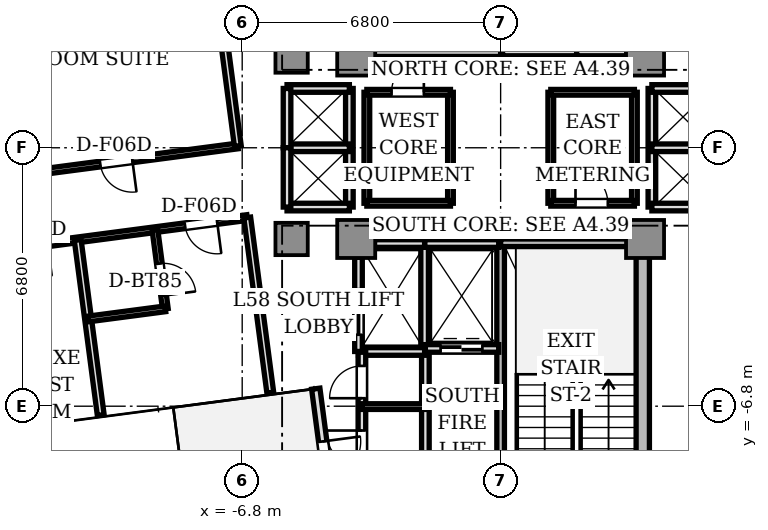
"""IFC4 building model, lengths in metres.
Left out: names, types, materials, properties, quantities, classifications, styles, units other than length and angle.
Written with IfcOpenShell. Run it as: python <this file> out.ifc"""

import sys

from ifc_helpers import new_model, si_unit, direction, frame, frame_2d, origin, origin_2d, place, context, subcontext, project, spatial, rectangle, extrude, source, transform, mapped, element, fill, save


model = new_model("IFC4")
c1 = context("Model", 3, precision=1e-05, world=origin(), true_north=direction((0.0, 1.0)))
c2 = subcontext(c1, "Body", "Model", "MODEL_VIEW")
j1 = project(units=[si_unit("LENGTHUNIT", "METRE"), si_unit("PLANEANGLEUNIT", "RADIAN")], contexts=[c1])
p1 = place(None, origin())
s1 = spatial("IfcSite", under=j1, at=p1, CompositionType="ELEMENT")
p2 = place(p1, origin())
s2 = spatial("IfcBuilding", under=s1, at=p2, CompositionType="ELEMENT")
p3 = place(p2, frame((0.0, 0.0, 209.85)))
s3 = spatial("IfcBuildingStorey", under=s2, at=p3, CompositionType="ELEMENT", Elevation=209.85)
p4 = place(p3, frame((3.74, -9.75, 0.0), z_axis=(0.0, 0.0, 1.0), x_axis=(0.0, 1.0, 0.0)))
e1 = element("IfcWall", 1, at=p4, inside=s3, PredefinedType="SHEAR", context=c2, shape_type="SweptSolid", body=[
    extrude(rectangle(XDim=6.9, YDim=0.35, at=frame_2d((3.45, 0.0))), origin(), (0.0, 0.0, 1.0), 3.11),
])
m1 = source(origin(), c2, "Body", "SweptSolid", [
    extrude(rectangle(XDim=1.0, YDim=1.0, at=origin_2d()), origin(), (0.0, 0.0, 1.0), 3.11),
])
for number, where, z_axis, x_axis in (
    (2, (-3.8, 2.4, 0.0), (0.0, 0.0, 1.0), (1.0, 0.0, 0.0)),
    (3, (3.8, 2.4, 0.0), (0.0, 0.0, 1.0), (1.0, 0.0, 0.0)),
    (4, (-3.8, -2.4, 0.0), (0.0, 0.0, 1.0), (1.0, 0.0, 0.0)),
    (5, (3.8, -2.4, 0.0), (0.0, 0.0, 1.0), (1.0, 0.0, 0.0)),
):
    element("IfcColumn", number, at=place(p3, frame(where, z_axis=z_axis, x_axis=x_axis)), inside=s3, PredefinedType="COLUMN", context=c2, shape_type="MappedRepresentation", body=[
        mapped(m1, transform((0.0, 0.0, 0.0), scale=1.0)),
    ])
m2 = source(origin(), c2, "Body", "SweptSolid", [
    extrude(rectangle(XDim=0.85, YDim=0.85, at=origin_2d()), origin(), (0.0, 0.0, 1.0), 3.11),
])
for number, where, z_axis, x_axis in (
    (6, (-5.5, 2.4, 0.0), (0.0, 0.0, 1.0), (1.0, 0.0, 0.0)),
    (7, (-5.5, -2.4, 0.0), (0.0, 0.0, 1.0), (1.0, 0.0, 0.0)),
):
    element("IfcColumn", number, at=place(p3, frame(where, z_axis=z_axis, x_axis=x_axis)), inside=s3, PredefinedType="COLUMN", context=c2, shape_type="MappedRepresentation", body=[
        mapped(m2, transform((0.0, 0.0, 0.0), scale=1.0)),
    ])
p5 = place(p3, frame((-4.864, -6.339, 0.0), z_axis=(0.0, 0.0, 1.0), x_axis=(0.130564442062, -0.991439824936, 0.0)))
e8 = element("IfcWall", 8, at=p5, inside=s3, PredefinedType="STANDARD", context=c2, shape_type="SweptSolid", body=[
    extrude(rectangle(XDim=2.7, YDim=0.22, at=frame_2d((1.35, 0.0))), origin(), (0.0, 0.0, 1.0), 3.11),
])
p6 = place(p5, frame((1.4, 0.0, 0.0)))
e9 = element("IfcOpeningElement", 9, at=p6, cuts=e8, PredefinedType="OPENING", context=c2, shape_type="SweptSolid", body=[
    extrude(rectangle(XDim=1.0, YDim=2.2, at=frame_2d((0.5, 1.1))), frame((0.0, 0.12, 0.0), z_axis=(0.0, -1.0, 0.0), x_axis=(1.0, 0.0, 0.0)), (0.0, 0.0, 1.0), 0.24),
])
p7 = place(p3, frame((0.0, 2.5, 0.0), z_axis=(0.0, 0.0, 1.0), x_axis=(0.0, 1.0, 0.0)))
e10 = element("IfcWall", 10, at=p7, inside=s3, PredefinedType="SOLIDWALL", context=c2, shape_type="SweptSolid", body=[
    extrude(rectangle(XDim=7.68, YDim=0.2, at=frame_2d((3.84, 0.0))), origin(), (0.0, 0.0, 1.0), 3.11),
])
p8 = place(p7, frame((6.36, 0.0, 0.0)))
e11 = element("IfcOpeningElement", 11, at=p8, cuts=e10, PredefinedType="OPENING", context=c2, shape_type="SweptSolid", body=[
    extrude(rectangle(XDim=1.1, YDim=2.15, at=frame_2d((0.55, 1.075))), frame((0.0, 0.11, 0.0), z_axis=(0.0, -1.0, 0.0), x_axis=(1.0, 0.0, 0.0)), (0.0, 0.0, 1.0), 0.22),
])
p9 = place(p3, frame((-3.72, 2.5, 0.0), z_axis=(0.0, 0.0, 1.0), x_axis=(1.0, 0.0, 0.0)))
e12 = element("IfcWall", 12, at=p9, inside=s3, PredefinedType="SOLIDWALL", context=c2, shape_type="SweptSolid", body=[
    extrude(rectangle(XDim=3.72, YDim=0.2, at=frame_2d((1.86, 0.0))), origin(), (0.0, 0.0, 1.0), 3.11),
])
p10 = place(p3, frame((0.0, -10.18, 0.0), z_axis=(0.0, 0.0, 1.0), x_axis=(0.0, 1.0, 0.0)))
e13 = element("IfcWall", 13, at=p10, inside=s3, PredefinedType="SOLIDWALL", context=c2, shape_type="SweptSolid", body=[
    extrude(rectangle(XDim=7.68, YDim=0.2, at=frame_2d((3.84, 0.0))), origin(), (0.0, 0.0, 1.0), 3.11),
])
p11 = place(p10, frame((0.28, 0.0, 0.0)))
e14 = element("IfcOpeningElement", 14, at=p11, cuts=e13, PredefinedType="OPENING", context=c2, shape_type="SweptSolid", body=[
    extrude(rectangle(XDim=1.1, YDim=2.15, at=frame_2d((0.55, 1.075))), frame((0.0, 0.11, 0.0), z_axis=(0.0, -1.0, 0.0), x_axis=(1.0, 0.0, 0.0)), (0.0, 0.0, 1.0), 0.22),
])
p12 = place(p3, frame((0.0, -2.5, 0.0), z_axis=(0.0, 0.0, 1.0), x_axis=(1.0, 0.0, 0.0)))
e15 = element("IfcWall", 15, at=p12, inside=s3, PredefinedType="SOLIDWALL", context=c2, shape_type="SweptSolid", body=[
    extrude(rectangle(XDim=3.72, YDim=0.2, at=frame_2d((1.86, 0.0))), origin(), (0.0, 0.0, 1.0), 3.11),
])
p13 = place(p3, frame((-1.98, -9.98, 0.0), z_axis=(0.0, 0.0, 1.0), x_axis=(0.0, 1.0, 0.0)))
e16 = element("IfcWall", 16, at=p13, inside=s3, PredefinedType="SOLIDWALL", context=c2, shape_type="SweptSolid", body=[
    extrude(rectangle(XDim=4.66, YDim=0.2, at=frame_2d((2.33, 0.0))), origin(), (0.0, 0.0, 1.0), 2.66),
])
p14 = place(p13, frame((0.2, 0.0, 0.0)))
e17 = element("IfcOpeningElement", 17, at=p14, cuts=e16, PredefinedType="OPENING", context=c2, shape_type="SweptSolid", body=[
    extrude(rectangle(XDim=0.85, YDim=2.1, at=frame_2d((0.425, 1.05))), frame((0.0, 0.11, 0.0), z_axis=(0.0, -1.0, 0.0), x_axis=(1.0, 0.0, 0.0)), (0.0, 0.0, 1.0), 0.22),
])
p15 = place(p3, frame((2.0, 2.5, 0.0), z_axis=(0.0, 0.0, 1.0), x_axis=(0.0, 1.0, 0.0)))
e18 = element("IfcWall", 18, at=p15, inside=s3, PredefinedType="SOLIDWALL", context=c2, shape_type="SweptSolid", body=[
    extrude(rectangle(XDim=2.78, YDim=0.2, at=frame_2d((1.39, 0.0))), origin(), (0.0, 0.0, 1.0), 2.66),
])
p16 = place(p3, frame((0.05, 2.52, 0.0), z_axis=(0.0, 0.0, 1.0), x_axis=(1.0, 0.0, 0.0)))
e19 = element("IfcWall", 19, at=p16, inside=s3, PredefinedType="SOLIDWALL", context=c2, shape_type="SweptSolid", body=[
    extrude(rectangle(XDim=1.95, YDim=0.2, at=frame_2d((0.975, 0.0))), origin(), (0.0, 0.0, 1.0), 2.66),
])
p17 = place(p3, frame((-2.0, -5.28, 0.0), z_axis=(0.0, 0.0, 1.0), x_axis=(0.0, 1.0, 0.0)))
e20 = element("IfcWall", 20, at=p17, inside=s3, PredefinedType="SOLIDWALL", context=c2, shape_type="SweptSolid", body=[
    extrude(rectangle(XDim=2.78, YDim=0.2, at=frame_2d((1.39, 0.0))), origin(), (0.0, 0.0, 1.0), 2.66),
])
p18 = place(p3, frame((-2.0, -2.52, 0.0), z_axis=(0.0, 0.0, 1.0), x_axis=(1.0, 0.0, 0.0)))
e21 = element("IfcWall", 21, at=p18, inside=s3, PredefinedType="SOLIDWALL", context=c2, shape_type="SweptSolid", body=[
    extrude(rectangle(XDim=1.95, YDim=0.2, at=frame_2d((0.975, 0.0))), origin(), (0.0, 0.0, 1.0), 2.66),
])
p19 = place(p3, frame((-1.98, -5.28, 0.0), z_axis=(0.0, 0.0, 1.0), x_axis=(1.0, 0.0, 0.0)))
e22 = element("IfcWall", 22, at=p19, inside=s3, PredefinedType="SOLIDWALL", context=c2, shape_type="SweptSolid", body=[
    extrude(rectangle(XDim=1.93, YDim=0.2, at=frame_2d((0.965, 0.0))), origin(), (0.0, 0.0, 1.0), 2.66),
])
p20 = place(p19, frame((0.4, 0.0, 0.0)))
e23 = element("IfcOpeningElement", 23, at=p20, cuts=e22, PredefinedType="OPENING", context=c2, shape_type="SweptSolid", body=[
    extrude(rectangle(XDim=1.1, YDim=2.2, at=frame_2d((0.55, 1.1))), frame((0.0, 0.11, 0.0), z_axis=(0.0, -1.0, 0.0), x_axis=(1.0, 0.0, 0.0)), (0.0, 0.0, 1.0), 0.22),
])
for number, where, z_axis, x_axis in (
    (24, (2.0, 2.52, 0.0), (0.0, 0.0, 1.0), (1.0, 0.0, 0.0)),
    (25, (-3.32, -2.52, 0.0), (0.0, 0.0, 1.0), (1.0, 0.0, 0.0)),
):
    element("IfcWall", number, at=place(p3, frame(where, z_axis=z_axis, x_axis=x_axis)), inside=s3, PredefinedType="SOLIDWALL", context=c2, shape_type="SweptSolid", body=[
        extrude(rectangle(XDim=1.32, YDim=0.2, at=frame_2d((0.66, 0.0))), origin(), (0.0, 0.0, 1.0), 2.66),
    ])
p21 = place(p3, frame((-3.74, -5.36, 0.0), z_axis=(0.0, 0.0, 1.0), x_axis=(1.0, 0.0, 0.0)))
e26 = element("IfcWall", 26, at=p21, inside=s3, PredefinedType="SOLIDWALL", context=c2, shape_type="SweptSolid", body=[
    extrude(rectangle(XDim=1.74, YDim=0.2, at=frame_2d((0.87, 0.0))), origin(), (0.0, 0.0, 1.0), 2.66),
])
p22 = place(p3, frame((-3.74, -5.36, 0.0), z_axis=(0.0, 0.0, 1.0), x_axis=(0.0, 1.0, 0.0)))
e27 = element("IfcWall", 27, at=p22, inside=s3, PredefinedType="SOLIDWALL", context=c2, shape_type="SweptSolid", body=[
    extrude(rectangle(XDim=2.48, YDim=0.2, at=frame_2d((1.24, 0.0))), origin(), (0.0, 0.0, 1.0), 2.66),
])
p23 = place(p22, frame((0.44, 0.0, 0.0)))
e28 = element("IfcOpeningElement", 28, at=p23, cuts=e27, PredefinedType="OPENING", context=c2, shape_type="SweptSolid", body=[
    extrude(rectangle(XDim=1.2, YDim=2.2, at=frame_2d((0.6, 1.1))), frame((0.0, 0.11, 0.0), z_axis=(0.0, -1.0, 0.0), x_axis=(1.0, 0.0, 0.0)), (0.0, 0.0, 1.0), 0.22),
])
p24 = place(p3, frame((3.98, -1.56, 0.0), z_axis=(0.0, 0.0, 1.0), x_axis=(0.0, 1.0, 0.0)))
e29 = element("IfcWall", 29, at=p24, inside=s3, PredefinedType="SOLIDWALL", context=c2, shape_type="SweptSolid", body=[
    extrude(rectangle(XDim=3.12, YDim=0.2, at=frame_2d((1.56, 0.0))), origin(), (0.0, 0.0, 1.0), 2.33),
])
for number, where, z_axis, x_axis in (
    (30, (3.98, 1.56, 0.0), (0.0, 0.0, 1.0), (1.0, 0.0, 0.0)),
    (31, (3.98, -1.56, 0.0), (0.0, 0.0, 1.0), (1.0, 0.0, 0.0)),
    (32, (3.98, 0.0, 0.0), (0.0, 0.0, 1.0), (1.0, 0.0, 0.0)),
):
    element("IfcWall", number, at=place(p3, frame(where, z_axis=z_axis, x_axis=x_axis)), inside=s3, PredefinedType="SOLIDWALL", context=c2, shape_type="SweptSolid", body=[
        extrude(rectangle(XDim=1.64, YDim=0.2, at=frame_2d((0.82, 0.0))), origin(), (0.0, 0.0, 1.0), 2.66),
    ])
p25 = place(p3, frame((-3.98, -1.56, 0.0), z_axis=(0.0, 0.0, 1.0), x_axis=(0.0, 1.0, 0.0)))
e33 = element("IfcWall", 33, at=p25, inside=s3, PredefinedType="SOLIDWALL", context=c2, shape_type="SweptSolid", body=[
    extrude(rectangle(XDim=3.12, YDim=0.2, at=frame_2d((1.56, 0.0))), origin(), (0.0, 0.0, 1.0), 2.33),
])
for number, where, z_axis, x_axis in (
    (34, (-5.62, 1.56, 0.0), (0.0, 0.0, 1.0), (1.0, 0.0, 0.0)),
    (35, (-5.62, -1.56, 0.0), (0.0, 0.0, 1.0), (1.0, 0.0, 0.0)),
    (36, (-5.62, 0.0, 0.0), (0.0, 0.0, 1.0), (1.0, 0.0, 0.0)),
):
    element("IfcWall", number, at=place(p3, frame(where, z_axis=z_axis, x_axis=x_axis)), inside=s3, PredefinedType="SOLIDWALL", context=c2, shape_type="SweptSolid", body=[
        extrude(rectangle(XDim=1.64, YDim=0.2, at=frame_2d((0.82, 0.0))), origin(), (0.0, 0.0, 1.0), 2.66),
    ])
for number, where, z_axis, x_axis in (
    (37, (-5.62, 0.0, 0.0), (0.0, 0.0, 1.0), (0.0, 1.0, 0.0)),
    (38, (-5.62, -1.56, 0.0), (0.0, 0.0, 1.0), (0.0, 1.0, 0.0)),
):
    element("IfcWall", number, at=place(p3, frame(where, z_axis=z_axis, x_axis=x_axis)), inside=s3, PredefinedType="SOLIDWALL", context=c2, shape_type="SweptSolid", body=[
        extrude(rectangle(XDim=1.56, YDim=0.2, at=frame_2d((0.78, 0.0))), origin(), (0.0, 0.0, 1.0), 2.66),
    ])
p26 = place(p3, frame((-3.65, -8.81, 0.0), z_axis=(0.0, 0.0, 1.0), x_axis=(0.0, 1.0, 0.0)))
e39 = element("IfcWall", 39, at=p26, inside=s3, PredefinedType="SOLIDWALL", context=c2, shape_type="SweptSolid", body=[
    extrude(rectangle(XDim=3.43, YDim=0.2, at=frame_2d((1.715, 0.0))), origin(), (0.0, 0.0, 1.0), 2.66),
])
p27 = place(p26, frame((0.42, 0.0, 0.0)))
e40 = element("IfcOpeningElement", 40, at=p27, cuts=e39, PredefinedType="OPENING", context=c2, shape_type="SweptSolid", body=[
    extrude(rectangle(XDim=0.95, YDim=2.15, at=frame_2d((0.475, 1.075))), frame((0.0, 0.11, 0.0), z_axis=(0.0, -1.0, 0.0), x_axis=(1.0, 0.0, 0.0)), (0.0, 0.0, 1.0), 0.22),
])
p28 = place(p26, frame((2.22, 0.0, 0.0)))
e41 = element("IfcOpeningElement", 41, at=p28, cuts=e39, PredefinedType="OPENING", context=c2, shape_type="SweptSolid", body=[
    extrude(rectangle(XDim=0.85, YDim=2.1, at=frame_2d((0.425, 1.05))), frame((0.0, 0.11, 0.0), z_axis=(0.0, -1.0, 0.0), x_axis=(1.0, 0.0, 0.0)), (0.0, 0.0, 1.0), 0.22),
])
p29 = place(p3, frame((-3.65, -6.81, 0.0), z_axis=(0.0, 0.0, 1.0), x_axis=(1.0, 0.0, 0.0)))
e42 = element("IfcWall", 42, at=p29, inside=s3, PredefinedType="PARTITIONING", context=c2, shape_type="SweptSolid", body=[
    extrude(rectangle(XDim=1.67, YDim=0.15, at=frame_2d((0.835, 0.0))), origin(), (0.0, 0.0, 1.0), 2.66),
])
p30 = place(p3, frame((-1.32, -1.46, 0.0), z_axis=(0.0, 0.0, 1.0), x_axis=(0.0, 1.0, 0.0)))
e43 = element("IfcWall", 43, at=p30, inside=s3, PredefinedType="PARTITIONING", context=c2, shape_type="SweptSolid", body=[
    extrude(rectangle(XDim=2.92, YDim=0.15, at=frame_2d((1.46, 0.0))), origin(), (0.0, 0.0, 1.0), 2.66),
])
p31 = place(p3, frame((-3.52, -1.46, 0.0), z_axis=(0.0, 0.0, 1.0), x_axis=(0.0, 1.0, 0.0)))
e44 = element("IfcWall", 44, at=p31, inside=s3, PredefinedType="PARTITIONING", context=c2, shape_type="SweptSolid", body=[
    extrude(rectangle(XDim=2.92, YDim=0.15, at=frame_2d((1.46, 0.0))), origin(), (0.0, 0.0, 1.0), 2.33),
])
p32 = place(p3, frame((-3.52, 1.46, 0.0), z_axis=(0.0, 0.0, 1.0), x_axis=(1.0, 0.0, 0.0)))
e45 = element("IfcWall", 45, at=p32, inside=s3, PredefinedType="PARTITIONING", context=c2, shape_type="SweptSolid", body=[
    extrude(rectangle(XDim=2.2, YDim=0.15, at=frame_2d((1.1, 0.0))), origin(), (0.0, 0.0, 1.0), 2.66),
])
p33 = place(p32, frame((0.65, 0.0, 0.0)))
e46 = element("IfcOpeningElement", 46, at=p33, cuts=e45, PredefinedType="OPENING", context=c2, shape_type="SweptSolid", body=[
    extrude(rectangle(XDim=0.85, YDim=2.1, at=frame_2d((0.425, 1.05))), frame((0.0, 0.085, 0.0), z_axis=(0.0, -1.0, 0.0), x_axis=(1.0, 0.0, 0.0)), (0.0, 0.0, 1.0), 0.17),
])
p34 = place(p3, frame((-3.52, -1.46, 0.0), z_axis=(0.0, 0.0, 1.0), x_axis=(1.0, 0.0, 0.0)))
e47 = element("IfcWall", 47, at=p34, inside=s3, PredefinedType="PARTITIONING", context=c2, shape_type="SweptSolid", body=[
    extrude(rectangle(XDim=2.2, YDim=0.15, at=frame_2d((1.1, 0.0))), origin(), (0.0, 0.0, 1.0), 2.66),
])
p35 = place(p3, frame((1.32, -1.46, 0.0), z_axis=(0.0, 0.0, 1.0), x_axis=(0.0, 1.0, 0.0)))
e48 = element("IfcWall", 48, at=p35, inside=s3, PredefinedType="PARTITIONING", context=c2, shape_type="SweptSolid", body=[
    extrude(rectangle(XDim=2.92, YDim=0.15, at=frame_2d((1.46, 0.0))), origin(), (0.0, 0.0, 1.0), 2.66),
])
p36 = place(p3, frame((3.52, -1.46, 0.0), z_axis=(0.0, 0.0, 1.0), x_axis=(0.0, 1.0, 0.0)))
e49 = element("IfcWall", 49, at=p36, inside=s3, PredefinedType="PARTITIONING", context=c2, shape_type="SweptSolid", body=[
    extrude(rectangle(XDim=2.92, YDim=0.15, at=frame_2d((1.46, 0.0))), origin(), (0.0, 0.0, 1.0), 2.33),
])
p37 = place(p3, frame((1.32, 1.46, 0.0), z_axis=(0.0, 0.0, 1.0), x_axis=(1.0, 0.0, 0.0)))
e50 = element("IfcWall", 50, at=p37, inside=s3, PredefinedType="PARTITIONING", context=c2, shape_type="SweptSolid", body=[
    extrude(rectangle(XDim=2.2, YDim=0.15, at=frame_2d((1.1, 0.0))), origin(), (0.0, 0.0, 1.0), 2.66),
])
p38 = place(p3, frame((1.32, -1.46, 0.0), z_axis=(0.0, 0.0, 1.0), x_axis=(1.0, 0.0, 0.0)))
e51 = element("IfcWall", 51, at=p38, inside=s3, PredefinedType="PARTITIONING", context=c2, shape_type="SweptSolid", body=[
    extrude(rectangle(XDim=2.2, YDim=0.15, at=frame_2d((1.1, 0.0))), origin(), (0.0, 0.0, 1.0), 2.66),
])
p39 = place(p38, frame((0.65, 0.0, 0.0)))
e52 = element("IfcOpeningElement", 52, at=p39, cuts=e51, PredefinedType="OPENING", context=c2, shape_type="SweptSolid", body=[
    extrude(rectangle(XDim=0.85, YDim=2.1, at=frame_2d((0.425, 1.05))), frame((0.0, 0.085, 0.0), z_axis=(0.0, -1.0, 0.0), x_axis=(1.0, 0.0, 0.0)), (0.0, 0.0, 1.0), 0.17),
])
p40 = place(p3, frame((-6.667, -1.836, 0.0), z_axis=(0.0, 0.0, 1.0), x_axis=(-0.99144358168, -0.130535912089, 0.0)))
e53 = element("IfcWall", 53, at=p40, inside=s3, PredefinedType="PARTITIONING", context=c2, shape_type="SweptSolid", body=[
    extrude(rectangle(XDim=9.0, YDim=0.15, at=frame_2d((4.5, 0.0))), origin(), (0.0, 0.0, 1.0), 2.66),
])
p41 = place(p40, frame((0.8, 0.0, 0.0)))
e54 = element("IfcOpeningElement", 54, at=p41, cuts=e53, PredefinedType="OPENING", context=c2, shape_type="SweptSolid", body=[
    extrude(rectangle(XDim=0.85, YDim=2.1, at=frame_2d((0.425, 1.05))), frame((0.0, 0.085, 0.0), z_axis=(0.0, -1.0, 0.0), x_axis=(1.0, 0.0, 0.0)), (0.0, 0.0, 1.0), 0.17),
])
p42 = place(p40, frame((5.3, 0.0, 0.0)))
e55 = element("IfcOpeningElement", 55, at=p42, cuts=e53, PredefinedType="OPENING", context=c2, shape_type="SweptSolid", body=[
    extrude(rectangle(XDim=0.85, YDim=2.1, at=frame_2d((0.425, 1.05))), frame((0.0, 0.085, 0.0), z_axis=(0.0, -1.0, 0.0), x_axis=(1.0, 0.0, 0.0)), (0.0, 0.0, 1.0), 0.17),
])
p43 = place(p3, frame((-6.915, 0.048, 0.0), z_axis=(0.0, 0.0, 1.0), x_axis=(-0.991444043898, -0.130532401413, 0.0)))
e56 = element("IfcWall", 56, at=p43, inside=s3, PredefinedType="PARTITIONING", context=c2, shape_type="SweptSolid", body=[
    extrude(rectangle(XDim=9.0, YDim=0.15, at=frame_2d((4.5, 0.0))), origin(), (0.0, 0.0, 1.0), 2.66),
])
p44 = place(p43, frame((2.8, 0.0, 0.0)))
e57 = element("IfcOpeningElement", 57, at=p44, cuts=e56, PredefinedType="OPENING", context=c2, shape_type="SweptSolid", body=[
    extrude(rectangle(XDim=0.85, YDim=2.1, at=frame_2d((0.425, 1.05))), frame((0.0, 0.085, 0.0), z_axis=(0.0, -1.0, 0.0), x_axis=(1.0, 0.0, 0.0)), (0.0, 0.0, 1.0), 0.17),
])
p45 = place(p3, frame((-6.667, -1.836, 0.0), z_axis=(0.0, 0.0, 1.0), x_axis=(0.13051970184, -0.991445715827, 0.0)))
e58 = element("IfcWall", 58, at=p45, inside=s3, PredefinedType="PARTITIONING", context=c2, shape_type="SweptSolid", body=[
    extrude(rectangle(XDim=4.65, YDim=0.18, at=frame_2d((2.325, 0.0))), origin(), (0.0, 0.0, 1.0), 2.66),
])
p46 = place(p3, frame((-7.522, 4.658, 0.0), z_axis=(0.0, 0.0, 1.0), x_axis=(0.130526496103, -0.991444821367, 0.0)))
e59 = element("IfcWall", 59, at=p46, inside=s3, PredefinedType="PARTITIONING", context=c2, shape_type="SweptSolid", body=[
    extrude(rectangle(XDim=4.65, YDim=0.18, at=frame_2d((2.325, 0.0))), origin(), (0.0, 0.0, 1.0), 2.66),
])
p47 = place(p3, frame((-11.129, -2.423, 0.0), z_axis=(0.0, 0.0, 1.0), x_axis=(0.13051970184, -0.991445715827, 0.0)))
e60 = element("IfcWall", 60, at=p47, inside=s3, PredefinedType="PARTITIONING", context=c2, shape_type="SweptSolid", body=[
    extrude(rectangle(XDim=4.65, YDim=0.18, at=frame_2d((2.325, 0.0))), origin(), (0.0, 0.0, 1.0), 2.66),
])
p48 = place(p3, frame((-9.096, -2.156, 0.0), z_axis=(0.0, 0.0, 1.0), x_axis=(0.130556761174, -0.991440836415, 0.0)))
e61 = element("IfcWall", 61, at=p48, inside=s3, PredefinedType="PARTITIONING", context=c2, shape_type="SweptSolid", body=[
    extrude(rectangle(XDim=2.1, YDim=0.15, at=frame_2d((1.05, 0.0))), origin(), (0.0, 0.0, 1.0), 2.66),
])
p49 = place(p48, frame((0.9, 0.0, 0.0)))
e62 = element("IfcOpeningElement", 62, at=p49, cuts=e61, PredefinedType="OPENING", context=c2, shape_type="SweptSolid", body=[
    extrude(rectangle(XDim=0.85, YDim=2.1, at=frame_2d((0.425, 1.05))), frame((0.0, 0.085, 0.0), z_axis=(0.0, -1.0, 0.0), x_axis=(1.0, 0.0, 0.0)), (0.0, 0.0, 1.0), 0.17),
])
p50 = place(p3, frame((-8.822, -4.238, 0.0), z_axis=(0.0, 0.0, 1.0), x_axis=(-0.991444969909, -0.13052536781, 0.0)))
e63 = element("IfcWall", 63, at=p50, inside=s3, PredefinedType="PARTITIONING", context=c2, shape_type="SweptSolid", body=[
    extrude(rectangle(XDim=2.05, YDim=0.15, at=frame_2d((1.025, 0.0))), origin(), (0.0, 0.0, 1.0), 2.66),
])
m3 = source(origin(), c2, "Body", "SweptSolid", [
    extrude(rectangle(XDim=1.0, YDim=0.05, at=origin_2d()), origin(), (0.0, 0.0, 1.0), 2.2),
])
p51 = place(p6, frame((0.5, 0.0, 0.0)))
e64 = element("IfcDoor", 64, at=p51, inside=s3, OperationType="SINGLE_SWING_LEFT", PredefinedType="DOOR", context=c2, shape_type="MappedRepresentation", body=[
    mapped(m3, transform((0.0, 0.0, 0.0), scale=1.0)),
])
fill(e9, e64)
m4 = source(origin(), c2, "Body", "SweptSolid", [
    extrude(rectangle(XDim=1.1, YDim=0.05, at=origin_2d()), origin(), (0.0, 0.0, 1.0), 2.2),
])
p52 = place(p20, frame((0.55, 0.0, 0.0)))
e65 = element("IfcDoor", 65, at=p52, inside=s3, OperationType="DOUBLE_DOOR_SLIDING", PredefinedType="DOOR", context=c2, shape_type="MappedRepresentation", body=[
    mapped(m4, transform((0.0, 0.0, 0.0), scale=1.0)),
])
fill(e23, e65)
m5 = source(origin(), c2, "Body", "SweptSolid", [
    extrude(rectangle(XDim=1.2, YDim=0.05, at=origin_2d()), origin(), (0.0, 0.0, 1.0), 2.2),
])
p53 = place(p23, frame((0.6, 0.0, 0.0)))
e66 = element("IfcDoor", 66, at=p53, inside=s3, OperationType="DOUBLE_DOOR_SLIDING", PredefinedType="DOOR", context=c2, shape_type="MappedRepresentation", body=[
    mapped(m5, transform((0.0, 0.0, 0.0), scale=1.0)),
])
fill(e28, e66)
m6 = source(origin(), c2, "Body", "SweptSolid", [
    extrude(rectangle(XDim=0.95, YDim=0.05, at=origin_2d()), origin(), (0.0, 0.0, 1.0), 2.15),
])
p54 = place(p27, frame((0.475, 0.0, 0.0)))
e67 = element("IfcDoor", 67, at=p54, inside=s3, OperationType="SINGLE_SWING_RIGHT", PredefinedType="DOOR", context=c2, shape_type="MappedRepresentation", body=[
    mapped(m6, transform((0.0, 0.0, 0.0), scale=1.0)),
])
fill(e40, e67)
m7 = source(origin(), c2, "Body", "SweptSolid", [
    extrude(rectangle(XDim=0.85, YDim=0.05, at=origin_2d()), origin(), (0.0, 0.0, 1.0), 2.1),
])
p55 = place(p28, frame((0.425, 0.0, 0.0)))
e68 = element("IfcDoor", 68, at=p55, inside=s3, OperationType="SINGLE_SWING_LEFT", PredefinedType="DOOR", context=c2, shape_type="MappedRepresentation", body=[
    mapped(m7, transform((0.0, 0.0, 0.0), scale=1.0)),
])
fill(e41, e68)
p56 = place(p33, frame((0.425, 0.0, 0.0)))
e69 = element("IfcDoor", 69, at=p56, inside=s3, OperationType="SINGLE_SWING_RIGHT", PredefinedType="DOOR", context=c2, shape_type="MappedRepresentation", body=[
    mapped(m7, transform((0.0, 0.0, 0.0), scale=1.0)),
])
fill(e46, e69)
p57 = place(p39, frame((0.425, 0.0, 0.0)))
e70 = element("IfcDoor", 70, at=p57, inside=s3, OperationType="SINGLE_SWING_LEFT", PredefinedType="DOOR", context=c2, shape_type="MappedRepresentation", body=[
    mapped(m7, transform((0.0, 0.0, 0.0), scale=1.0)),
])
fill(e52, e70)
p58 = place(p49, frame((0.425, 0.0, 0.0)))
e71 = element("IfcDoor", 71, at=p58, inside=s3, OperationType="SINGLE_SWING_RIGHT", PredefinedType="DOOR", context=c2, shape_type="MappedRepresentation", body=[
    mapped(m7, transform((0.0, 0.0, 0.0), scale=1.0)),
])
fill(e62, e71)
p59 = place(p41, frame((0.425, 0.0, 0.0)))
e72 = element("IfcDoor", 72, at=p59, inside=s3, OperationType="SINGLE_SWING_LEFT", PredefinedType="DOOR", context=c2, shape_type="MappedRepresentation", body=[
    mapped(m7, transform((0.0, 0.0, 0.0), scale=1.0)),
])
fill(e54, e72)
p60 = place(p44, frame((0.425, 0.0, 0.0)))
e73 = element("IfcDoor", 73, at=p60, inside=s3, OperationType="SINGLE_SWING_LEFT", PredefinedType="DOOR", context=c2, shape_type="MappedRepresentation", body=[
    mapped(m7, transform((0.0, 0.0, 0.0), scale=1.0)),
])
fill(e57, e73)
save(model, sys.argv[1])
